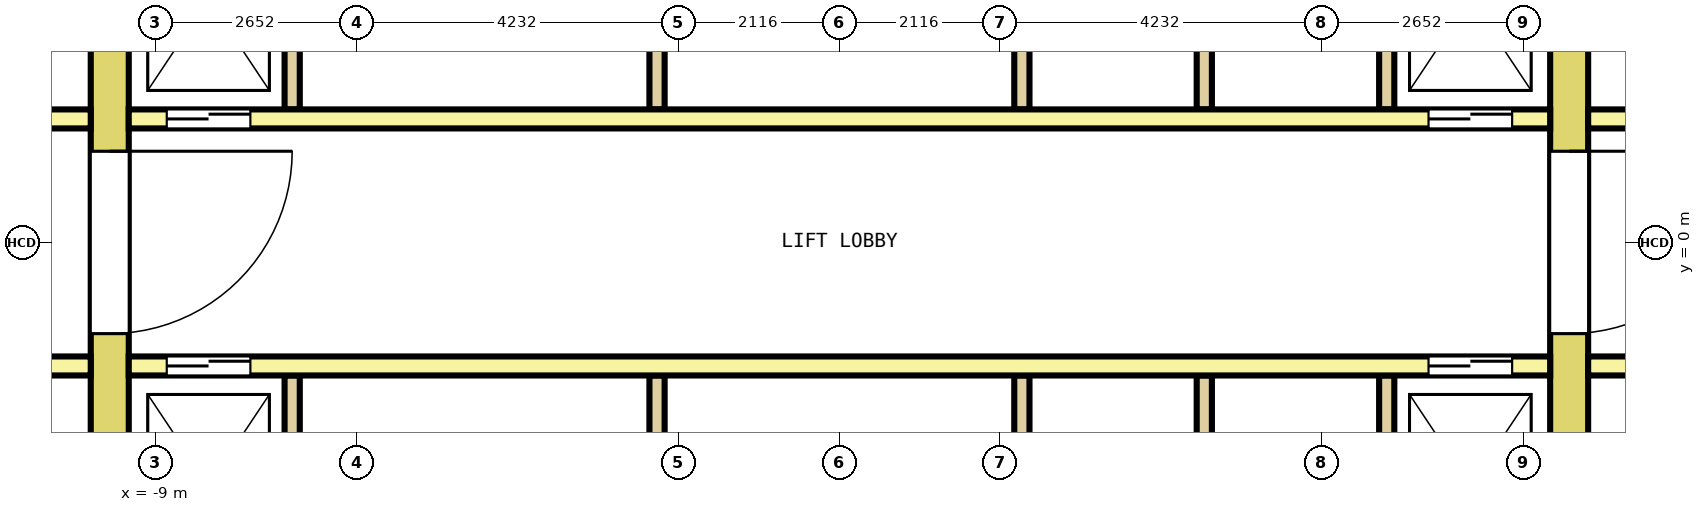
"""IFC4 building model, lengths in metres.
Left out: names, types, materials, properties, quantities, classifications, styles, units other than length and angle.
Written with IfcOpenShell. Run it as: python <this file> out.ifc"""

import sys

from ifc_helpers import new_model, si_unit, direction, frame, frame_2d, origin, place, context, subcontext, project, spatial, rectangle, extrude, element, fill, save


model = new_model("IFC4")
c1 = context("Model", 3, precision=1e-05, world=origin(), true_north=direction((0.0, 1.0)))
c2 = subcontext(c1, "Body", "Model", "MODEL_VIEW")
j1 = project(units=[si_unit("LENGTHUNIT", "METRE"), si_unit("PLANEANGLEUNIT", "RADIAN")], contexts=[c1])
p1 = place(None, origin())
s1 = spatial("IfcSite", under=j1, at=p1, CompositionType="ELEMENT")
p2 = place(p1, origin())
s2 = spatial("IfcBuilding", under=s1, at=p2, CompositionType="ELEMENT")
p3 = place(p2, frame((0.0, 0.0, 63.0)))
s3 = spatial("IfcBuildingStorey", under=s2, at=p3, CompositionType="ELEMENT", Elevation=63.0)
p4 = place(p3, frame((-9.6, -7.7, 0.0), z_axis=(0.0, 0.0, 1.0), x_axis=(0.0, 1.0, 0.0)))
e1 = element("IfcWall", 1, at=p4, inside=s3, PredefinedType="SHEAR", context=c2, shape_type="SweptSolid", body=[
    extrude(rectangle(XDim=15.4, YDim=0.5, at=frame_2d((7.7, 0.0))), origin(), (0.0, 0.0, 1.0), 4.1),
])
p5 = place(p4, frame((6.5, 0.0, 0.0)))
e2 = element("IfcOpeningElement", 2, at=p5, cuts=e1, PredefinedType="OPENING", context=c2, shape_type="SweptSolid", body=[
    extrude(rectangle(XDim=2.4, YDim=2.1, at=frame_2d((1.2, 1.05))), frame((0.0, 0.26, 0.0), z_axis=(0.0, -1.0, 0.0), x_axis=(1.0, 0.0, 0.0)), (0.0, 0.0, 1.0), 0.52),
])
p6 = place(p4, frame((13.4, 0.0, 0.0)))
e3 = element("IfcOpeningElement", 3, at=p6, cuts=e1, PredefinedType="OPENING", context=c2, shape_type="SweptSolid", body=[
    extrude(rectangle(XDim=1.2, YDim=2.1, at=frame_2d((0.6, 1.05))), frame((0.0, 0.26, 0.0), z_axis=(0.0, -1.0, 0.0), x_axis=(1.0, 0.0, 0.0)), (0.0, 0.0, 1.0), 0.52),
])
p7 = place(p4, frame((0.8, 0.0, 0.0)))
e4 = element("IfcOpeningElement", 4, at=p7, cuts=e1, PredefinedType="OPENING", context=c2, shape_type="SweptSolid", body=[
    extrude(rectangle(XDim=1.2, YDim=2.1, at=frame_2d((0.6, 1.05))), frame((0.0, 0.26, 0.0), z_axis=(0.0, -1.0, 0.0), x_axis=(1.0, 0.0, 0.0)), (0.0, 0.0, 1.0), 0.52),
])
p8 = place(p3, frame((9.6, -7.7, 0.0), z_axis=(0.0, 0.0, 1.0), x_axis=(0.0, 1.0, 0.0)))
e5 = element("IfcWall", 5, at=p8, inside=s3, PredefinedType="SHEAR", context=c2, shape_type="SweptSolid", body=[
    extrude(rectangle(XDim=15.4, YDim=0.5, at=frame_2d((7.7, 0.0))), origin(), (0.0, 0.0, 1.0), 4.1),
])
p9 = place(p8, frame((6.5, 0.0, 0.0)))
e6 = element("IfcOpeningElement", 6, at=p9, cuts=e5, PredefinedType="OPENING", context=c2, shape_type="SweptSolid", body=[
    extrude(rectangle(XDim=2.4, YDim=2.1, at=frame_2d((1.2, 1.05))), frame((0.0, 0.26, 0.0), z_axis=(0.0, -1.0, 0.0), x_axis=(1.0, 0.0, 0.0)), (0.0, 0.0, 1.0), 0.52),
])
p10 = place(p8, frame((13.4, 0.0, 0.0)))
e7 = element("IfcOpeningElement", 7, at=p10, cuts=e5, PredefinedType="OPENING", context=c2, shape_type="SweptSolid", body=[
    extrude(rectangle(XDim=1.2, YDim=2.1, at=frame_2d((0.6, 1.05))), frame((0.0, 0.26, 0.0), z_axis=(0.0, -1.0, 0.0), x_axis=(1.0, 0.0, 0.0)), (0.0, 0.0, 1.0), 0.52),
])
p11 = place(p8, frame((0.9, 0.0, 0.0)))
e8 = element("IfcOpeningElement", 8, at=p11, cuts=e5, PredefinedType="OPENING", context=c2, shape_type="SweptSolid", body=[
    extrude(rectangle(XDim=1.0, YDim=2.1, at=frame_2d((0.5, 1.05))), frame((0.0, 0.26, 0.0), z_axis=(0.0, -1.0, 0.0), x_axis=(1.0, 0.0, 0.0)), (0.0, 0.0, 1.0), 0.52),
])
p12 = place(p3, frame((-12.75, 1.625, 0.0), z_axis=(0.0, 0.0, 1.0), x_axis=(1.0, 0.0, 0.0)))
e9 = element("IfcWall", 9, at=p12, inside=s3, PredefinedType="SOLIDWALL", context=c2, shape_type="SweptSolid", body=[
    extrude(rectangle(XDim=2.9, YDim=0.25, at=frame_2d((1.45, 0.0))), origin(), (0.0, 0.0, 1.0), 4.1),
])
p13 = place(p12, frame((0.9, 0.0, 0.0)))
e10 = element("IfcOpeningElement", 10, at=p13, cuts=e9, PredefinedType="OPENING", context=c2, shape_type="SweptSolid", body=[
    extrude(rectangle(XDim=1.1, YDim=2.1, at=frame_2d((0.55, 1.05))), frame((0.0, 0.135, 0.0), z_axis=(0.0, -1.0, 0.0), x_axis=(1.0, 0.0, 0.0)), (0.0, 0.0, 1.0), 0.27),
])
p14 = place(p3, frame((-9.35, 1.625, 0.0), z_axis=(0.0, 0.0, 1.0), x_axis=(1.0, 0.0, 0.0)))
e11 = element("IfcWall", 11, at=p14, inside=s3, PredefinedType="SOLIDWALL", context=c2, shape_type="SweptSolid", body=[
    extrude(rectangle(XDim=18.7, YDim=0.25, at=frame_2d((9.35, 0.0))), origin(), (0.0, 0.0, 1.0), 4.1),
])
p15 = place(p14, frame((0.5, 0.0, 0.0)))
e12 = element("IfcOpeningElement", 12, at=p15, cuts=e11, PredefinedType="OPENING", context=c2, shape_type="SweptSolid", body=[
    extrude(rectangle(XDim=1.1, YDim=2.1, at=frame_2d((0.55, 1.05))), frame((0.0, 0.135, 0.0), z_axis=(0.0, -1.0, 0.0), x_axis=(1.0, 0.0, 0.0)), (0.0, 0.0, 1.0), 0.27),
])
p16 = place(p14, frame((17.1, 0.0, 0.0)))
e13 = element("IfcOpeningElement", 13, at=p16, cuts=e11, PredefinedType="OPENING", context=c2, shape_type="SweptSolid", body=[
    extrude(rectangle(XDim=1.1, YDim=2.1, at=frame_2d((0.55, 1.05))), frame((0.0, 0.135, 0.0), z_axis=(0.0, -1.0, 0.0), x_axis=(1.0, 0.0, 0.0)), (0.0, 0.0, 1.0), 0.27),
])
p17 = place(p3, frame((9.85, 1.625, 0.0), z_axis=(0.0, 0.0, 1.0), x_axis=(1.0, 0.0, 0.0)))
e14 = element("IfcWall", 14, at=p17, inside=s3, PredefinedType="SOLIDWALL", context=c2, shape_type="SweptSolid", body=[
    extrude(rectangle(XDim=2.9, YDim=0.25, at=frame_2d((1.45, 0.0))), origin(), (0.0, 0.0, 1.0), 4.1),
])
p18 = place(p17, frame((0.9, 0.0, 0.0)))
e15 = element("IfcOpeningElement", 15, at=p18, cuts=e14, PredefinedType="OPENING", context=c2, shape_type="SweptSolid", body=[
    extrude(rectangle(XDim=1.1, YDim=2.1, at=frame_2d((0.55, 1.05))), frame((0.0, 0.135, 0.0), z_axis=(0.0, -1.0, 0.0), x_axis=(1.0, 0.0, 0.0)), (0.0, 0.0, 1.0), 0.27),
])
for number, where, z_axis, x_axis in (
    (16, (-7.2, 1.75, 0.0), (0.0, 0.0, 1.0), (0.0, 1.0, 0.0)),
    (17, (-2.4, 1.75, 0.0), (0.0, 0.0, 1.0), (0.0, 1.0, 0.0)),
    (18, (2.4, 1.75, 0.0), (0.0, 0.0, 1.0), (0.0, 1.0, 0.0)),
    (19, (4.8, 1.75, 0.0), (0.0, 0.0, 1.0), (0.0, 1.0, 0.0)),
    (20, (7.2, 1.75, 0.0), (0.0, 0.0, 1.0), (0.0, 1.0, 0.0)),
):
    element("IfcWall", number, at=place(p3, frame(where, z_axis=z_axis, x_axis=x_axis)), inside=s3, PredefinedType="SOLIDWALL", context=c2, shape_type="SweptSolid", body=[
        extrude(rectangle(XDim=2.9, YDim=0.2, at=frame_2d((1.45, 0.0))), origin(), (0.0, 0.0, 1.0), 4.1),
    ])
p19 = place(p3, frame((-12.75, -1.625, 0.0), z_axis=(0.0, 0.0, 1.0), x_axis=(1.0, 0.0, 0.0)))
e21 = element("IfcWall", 21, at=p19, inside=s3, PredefinedType="SOLIDWALL", context=c2, shape_type="SweptSolid", body=[
    extrude(rectangle(XDim=2.9, YDim=0.25, at=frame_2d((1.45, 0.0))), origin(), (0.0, 0.0, 1.0), 4.1),
])
p20 = place(p19, frame((0.9, 0.0, 0.0)))
e22 = element("IfcOpeningElement", 22, at=p20, cuts=e21, PredefinedType="OPENING", context=c2, shape_type="SweptSolid", body=[
    extrude(rectangle(XDim=1.1, YDim=2.1, at=frame_2d((0.55, 1.05))), frame((0.0, 0.135, 0.0), z_axis=(0.0, -1.0, 0.0), x_axis=(1.0, 0.0, 0.0)), (0.0, 0.0, 1.0), 0.27),
])
p21 = place(p3, frame((-9.35, -1.625, 0.0), z_axis=(0.0, 0.0, 1.0), x_axis=(1.0, 0.0, 0.0)))
e23 = element("IfcWall", 23, at=p21, inside=s3, PredefinedType="SOLIDWALL", context=c2, shape_type="SweptSolid", body=[
    extrude(rectangle(XDim=18.7, YDim=0.25, at=frame_2d((9.35, 0.0))), origin(), (0.0, 0.0, 1.0), 4.1),
])
p22 = place(p21, frame((0.5, 0.0, 0.0)))
e24 = element("IfcOpeningElement", 24, at=p22, cuts=e23, PredefinedType="OPENING", context=c2, shape_type="SweptSolid", body=[
    extrude(rectangle(XDim=1.1, YDim=2.1, at=frame_2d((0.55, 1.05))), frame((0.0, 0.135, 0.0), z_axis=(0.0, -1.0, 0.0), x_axis=(1.0, 0.0, 0.0)), (0.0, 0.0, 1.0), 0.27),
])
p23 = place(p21, frame((17.1, 0.0, 0.0)))
e25 = element("IfcOpeningElement", 25, at=p23, cuts=e23, PredefinedType="OPENING", context=c2, shape_type="SweptSolid", body=[
    extrude(rectangle(XDim=1.1, YDim=2.1, at=frame_2d((0.55, 1.05))), frame((0.0, 0.135, 0.0), z_axis=(0.0, -1.0, 0.0), x_axis=(1.0, 0.0, 0.0)), (0.0, 0.0, 1.0), 0.27),
])
p24 = place(p3, frame((9.85, -1.625, 0.0), z_axis=(0.0, 0.0, 1.0), x_axis=(1.0, 0.0, 0.0)))
e26 = element("IfcWall", 26, at=p24, inside=s3, PredefinedType="SOLIDWALL", context=c2, shape_type="SweptSolid", body=[
    extrude(rectangle(XDim=2.9, YDim=0.25, at=frame_2d((1.45, 0.0))), origin(), (0.0, 0.0, 1.0), 4.1),
])
p25 = place(p24, frame((0.9, 0.0, 0.0)))
e27 = element("IfcOpeningElement", 27, at=p25, cuts=e26, PredefinedType="OPENING", context=c2, shape_type="SweptSolid", body=[
    extrude(rectangle(XDim=1.1, YDim=2.1, at=frame_2d((0.55, 1.05))), frame((0.0, 0.135, 0.0), z_axis=(0.0, -1.0, 0.0), x_axis=(1.0, 0.0, 0.0)), (0.0, 0.0, 1.0), 0.27),
])
for number, where, z_axis, x_axis in (
    (28, (-7.2, -4.65, 0.0), (0.0, 0.0, 1.0), (0.0, 1.0, 0.0)),
    (29, (-2.4, -4.65, 0.0), (0.0, 0.0, 1.0), (0.0, 1.0, 0.0)),
    (30, (2.4, -4.65, 0.0), (0.0, 0.0, 1.0), (0.0, 1.0, 0.0)),
    (31, (4.8, -4.65, 0.0), (0.0, 0.0, 1.0), (0.0, 1.0, 0.0)),
    (32, (7.2, -4.65, 0.0), (0.0, 0.0, 1.0), (0.0, 1.0, 0.0)),
):
    element("IfcWall", number, at=place(p3, frame(where, z_axis=z_axis, x_axis=x_axis)), inside=s3, PredefinedType="SOLIDWALL", context=c2, shape_type="SweptSolid", body=[
        extrude(rectangle(XDim=2.9, YDim=0.2, at=frame_2d((1.45, 0.0))), origin(), (0.0, 0.0, 1.0), 4.1),
    ])
p26 = place(p15, origin())
e33 = element("IfcDoor", 33, at=p26, inside=s3, OperationType="DOUBLE_DOOR_SLIDING", PredefinedType="DOOR", context=c2, shape_type="SweptSolid", body=[
    extrude(rectangle(XDim=1.1, YDim=2.1, at=frame_2d((0.55, 1.05))), frame((0.0, 0.075, 0.0), z_axis=(0.0, -1.0, 0.0), x_axis=(1.0, 0.0, 0.0)), (0.0, 0.0, 1.0), 0.15),
])
fill(e12, e33)
p27 = place(p16, origin())
e34 = element("IfcDoor", 34, at=p27, inside=s3, OperationType="DOUBLE_DOOR_SLIDING", PredefinedType="DOOR", context=c2, shape_type="SweptSolid", body=[
    extrude(rectangle(XDim=1.1, YDim=2.1, at=frame_2d((0.55, 1.05))), frame((0.0, 0.075, 0.0), z_axis=(0.0, -1.0, 0.0), x_axis=(1.0, 0.0, 0.0)), (0.0, 0.0, 1.0), 0.15),
])
fill(e13, e34)
p28 = place(p22, origin())
e35 = element("IfcDoor", 35, at=p28, inside=s3, OperationType="DOUBLE_DOOR_SLIDING", PredefinedType="DOOR", context=c2, shape_type="SweptSolid", body=[
    extrude(rectangle(XDim=1.1, YDim=2.1, at=frame_2d((0.55, 1.05))), frame((0.0, 0.075, 0.0), z_axis=(0.0, -1.0, 0.0), x_axis=(1.0, 0.0, 0.0)), (0.0, 0.0, 1.0), 0.15),
])
fill(e24, e35)
p29 = place(p23, origin())
e36 = element("IfcDoor", 36, at=p29, inside=s3, OperationType="DOUBLE_DOOR_SLIDING", PredefinedType="DOOR", context=c2, shape_type="SweptSolid", body=[
    extrude(rectangle(XDim=1.1, YDim=2.1, at=frame_2d((0.55, 1.05))), frame((0.0, 0.075, 0.0), z_axis=(0.0, -1.0, 0.0), x_axis=(1.0, 0.0, 0.0)), (0.0, 0.0, 1.0), 0.15),
])
fill(e25, e36)
p30 = place(p5, origin())
e37 = element("IfcDoor", 37, at=p30, inside=s3, OperationType="DOUBLE_DOOR_SINGLE_SWING", PredefinedType="DOOR", context=c2, shape_type="SweptSolid", body=[
    extrude(rectangle(XDim=2.4, YDim=2.1, at=frame_2d((1.2, 1.05))), frame((0.0, 0.2, 0.0), z_axis=(0.0, -1.0, 0.0), x_axis=(1.0, 0.0, 0.0)), (0.0, 0.0, 1.0), 0.4),
])
fill(e2, e37)
p31 = place(p9, origin())
e38 = element("IfcDoor", 38, at=p31, inside=s3, OperationType="DOUBLE_DOOR_SINGLE_SWING", PredefinedType="DOOR", context=c2, shape_type="SweptSolid", body=[
    extrude(rectangle(XDim=2.4, YDim=2.1, at=frame_2d((1.2, 1.05))), frame((0.0, 0.2, 0.0), z_axis=(0.0, -1.0, 0.0), x_axis=(1.0, 0.0, 0.0)), (0.0, 0.0, 1.0), 0.4),
])
fill(e6, e38)
save(model, sys.argv[1])
